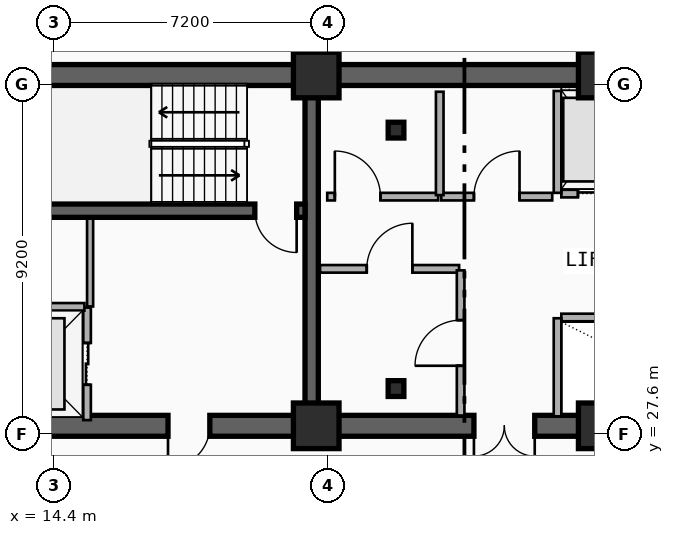
"""IFC4 building model, lengths in metres.
Left out: names, types, materials, properties, quantities, classifications, styles, units other than length and angle.
Written with IfcOpenShell. Run it as: python <this file> out.ifc"""

import sys

from ifc_helpers import new_model, si_unit, direction, frame, frame_2d, origin, origin_2d, place, context, subcontext, project, spatial, rectangle, i_section, extrude, element, fill, save


model = new_model("IFC4")
c1 = context("Model", 3, precision=1e-05, world=origin(), true_north=direction((0.0, 1.0)))
c2 = subcontext(c1, "Body", "Model", "MODEL_VIEW")
j1 = project(units=[si_unit("LENGTHUNIT", "METRE"), si_unit("PLANEANGLEUNIT", "RADIAN")], contexts=[c1])
p1 = place(None, origin())
s1 = spatial("IfcSite", under=j1, at=p1, CompositionType="ELEMENT")
p2 = place(p1, origin())
s2 = spatial("IfcBuilding", under=s1, at=p2, CompositionType="ELEMENT")
p3 = place(p2, frame((0.0, 0.0, 169.65)))
s3 = spatial("IfcBuildingStorey", under=s2, at=p3, CompositionType="ELEMENT", Elevation=169.65)
p4 = place(p3, frame((12.15, 37.05, 0.0), z_axis=(0.0, 0.0, 1.0), x_axis=(1.0, 0.0, 0.0)))
e1 = element("IfcWall", 1, at=p4, inside=s3, PredefinedType="SHEAR", context=c2, shape_type="SweptSolid", body=[
    extrude(rectangle(XDim=33.23, YDim=0.55, at=frame_2d((16.615, 0.0))), origin(), (0.0, 0.0, 1.0), 3.55),
])
p5 = place(p3, frame((21.18, 27.82, 0.0), z_axis=(0.0, 0.0, 1.0), x_axis=(-1.0, 0.0, 0.0)))
e2 = element("IfcWall", 2, at=p5, inside=s3, PredefinedType="SHEAR", context=c2, shape_type="SweptSolid", body=[
    extrude(rectangle(XDim=9.03, YDim=0.55, at=frame_2d((4.515, 0.0))), origin(), (0.0, 0.0, 1.0), 3.55),
])
p6 = place(p5, frame((2.68, 0.0, 0.0)))
e3 = element("IfcOpeningElement", 3, at=p6, cuts=e2, PredefinedType="OPENING", context=c2, shape_type="SweptSolid", body=[
    extrude(rectangle(XDim=1.1, YDim=2.15, at=frame_2d((0.55, 1.075))), frame((0.0, 0.285, 0.0), z_axis=(0.0, -1.0, 0.0), x_axis=(1.0, 0.0, 0.0)), (0.0, 0.0, 1.0), 0.57),
])
p7 = place(p3, frame((33.15, 27.82, 0.0), z_axis=(0.0, 0.0, 1.0), x_axis=(-1.0, 0.0, 0.0)))
e4 = element("IfcWall", 4, at=p7, inside=s3, PredefinedType="SHEAR", context=c2, shape_type="SweptSolid", body=[
    extrude(rectangle(XDim=11.97, YDim=0.55, at=frame_2d((5.985, 0.0))), origin(), (0.0, 0.0, 1.0), 3.55),
])
p8 = place(p7, frame((6.1, 0.0, 0.0)))
e5 = element("IfcOpeningElement", 5, at=p8, cuts=e4, PredefinedType="OPENING", context=c2, shape_type="SweptSolid", body=[
    extrude(rectangle(XDim=1.6, YDim=2.2, at=frame_2d((0.8, 1.1))), frame((0.0, 0.285, 0.0), z_axis=(0.0, -1.0, 0.0), x_axis=(1.0, 0.0, 0.0)), (0.0, 0.0, 1.0), 0.57),
])
p9 = place(p3, frame((21.18, 28.095, 0.0), z_axis=(0.0, 0.0, 1.0), x_axis=(0.0, 1.0, 0.0)))
e6 = element("IfcWall", 6, at=p9, inside=s3, PredefinedType="SHEAR", context=c2, shape_type="SweptSolid", body=[
    extrude(rectangle(XDim=8.68, YDim=0.35, at=frame_2d((4.34, 0.0))), origin(), (0.0, 0.0, 1.0), 3.55),
])
p10 = place(p3, frame((21.005, 33.48, 0.0), z_axis=(0.0, 0.0, 1.0), x_axis=(-1.0, 0.0, 0.0)))
e7 = element("IfcWall", 7, at=p10, inside=s3, PredefinedType="SHEAR", context=c2, shape_type="SweptSolid", body=[
    extrude(rectangle(XDim=8.58, YDim=0.35, at=frame_2d((4.29, 0.0))), origin(), (0.0, 0.0, 1.0), 3.55),
])
p11 = place(p10, frame((0.22, 0.0, 0.0)))
e8 = element("IfcOpeningElement", 8, at=p11, cuts=e7, PredefinedType="OPENING", context=c2, shape_type="SweptSolid", body=[
    extrude(rectangle(XDim=1.1, YDim=2.15, at=frame_2d((0.55, 1.075))), frame((0.0, 0.185, 0.0), z_axis=(0.0, -1.0, 0.0), x_axis=(1.0, 0.0, 0.0)), (0.0, 0.0, 1.0), 0.37),
])
for number, where, z_axis, x_axis in (
    (9, (23.4, 28.8, 0.0), (0.0, 0.0, 1.0), (1.0, 0.0, 0.0)),
    (10, (23.4, 35.6, 0.0), (0.0, 0.0, 1.0), (1.0, 0.0, 0.0)),
):
    element("IfcColumn", number, at=place(p3, frame(where, z_axis=z_axis, x_axis=x_axis)), inside=s3, PredefinedType="COLUMN", context=c2, shape_type="SweptSolid", body=[
        extrude(i_section(OverallWidth=0.413, OverallDepth=0.415, WebThickness=0.03, FlangeThickness=0.047, FilletRadius=0.015, at=origin_2d()), origin(), (0.0, 0.0, 1.0), 3.55),
    ])
for number, where, z_axis, x_axis in (
    (11, (21.3, 27.82, 0.0), (0.0, 0.0, 1.0), (1.0, 0.0, 0.0)),
    (12, (21.3, 37.05, 0.0), (0.0, 0.0, 1.0), (1.0, 0.0, 0.0)),
    (13, (28.8, 27.82, 0.0), (0.0, 0.0, 1.0), (1.0, 0.0, 0.0)),
    (14, (28.8, 37.05, 0.0), (0.0, 0.0, 1.0), (1.0, 0.0, 0.0)),
):
    element("IfcColumn", number, at=place(p3, frame(where, z_axis=z_axis, x_axis=x_axis)), inside=s3, PredefinedType="COLUMN", context=c2, shape_type="SweptSolid", body=[
        extrude(rectangle(XDim=1.2, YDim=1.2, at=origin_2d()), origin(), (0.0, 0.0, 1.0), 3.55),
    ])
p12 = place(p3, frame((15.27, 27.97, 0.0), z_axis=(0.0, 0.0, 1.0), x_axis=(0.0, 1.0, 0.0)))
e15 = element("IfcWall", 15, at=p12, inside=s3, PredefinedType="PARTITIONING", context=c2, shape_type="SweptSolid", body=[
    extrude(rectangle(XDim=2.96, YDim=0.2, at=frame_2d((1.48, 0.0))), origin(), (0.0, 0.0, 1.0), 2.36),
])
p13 = place(p12, frame((0.93, 0.0, 0.0)))
e16 = element("IfcOpeningElement", 16, at=p13, cuts=e15, PredefinedType="OPENING", context=c2, shape_type="SweptSolid", body=[
    extrude(rectangle(XDim=1.1, YDim=2.15, at=frame_2d((0.55, 1.075))), frame((0.0, 0.11, 0.0), z_axis=(0.0, -1.0, 0.0), x_axis=(1.0, 0.0, 0.0)), (0.0, 0.0, 1.0), 0.22),
])
p14 = place(p3, frame((12.45, 30.95, 0.0), z_axis=(0.0, 0.0, 1.0), x_axis=(1.0, 0.0, 0.0)))
e17 = element("IfcWall", 17, at=p14, inside=s3, PredefinedType="PARTITIONING", context=c2, shape_type="SweptSolid", body=[
    extrude(rectangle(XDim=2.75, YDim=0.2, at=frame_2d((1.375, 0.0))), origin(), (0.0, 0.0, 1.0), 2.36),
])
p15 = place(p3, frame((27.75, 30.67, 0.0), z_axis=(0.0, 0.0, 1.0), x_axis=(1.0, 0.0, 0.0)))
e18 = element("IfcWall", 18, at=p15, inside=s3, PredefinedType="PARTITIONING", context=c2, shape_type="SweptSolid", body=[
    extrude(rectangle(XDim=1.975, YDim=0.2, at=frame_2d((0.988, 0.0))), origin(), (0.0, 0.0, 1.0), 2.36),
])
p16 = place(p3, frame((27.65, 28.07, 0.0), z_axis=(0.0, 0.0, 1.0), x_axis=(0.0, 1.0, 0.0)))
e19 = element("IfcWall", 19, at=p16, inside=s3, PredefinedType="PARTITIONING", context=c2, shape_type="SweptSolid", body=[
    extrude(rectangle(XDim=2.58, YDim=0.2, at=frame_2d((1.29, 0.0))), origin(), (0.0, 0.0, 1.0), 2.36),
])
p17 = place(p3, frame((27.75, 33.93, 0.0), z_axis=(0.0, 0.0, 1.0), x_axis=(1.0, 0.0, 0.0)))
e20 = element("IfcWall", 20, at=p17, inside=s3, PredefinedType="PARTITIONING", context=c2, shape_type="SweptSolid", body=[
    extrude(rectangle(XDim=1.975, YDim=0.2, at=frame_2d((0.988, 0.0))), origin(), (0.0, 0.0, 1.0), 2.36),
])
p18 = place(p17, frame((0.438, 0.0, 0.0)))
e21 = element("IfcOpeningElement", 21, at=p18, cuts=e20, PredefinedType="OPENING", context=c2, shape_type="SweptSolid", body=[
    extrude(rectangle(XDim=1.1, YDim=2.15, at=frame_2d((0.55, 1.075))), frame((0.0, 0.11, 0.0), z_axis=(0.0, -1.0, 0.0), x_axis=(1.0, 0.0, 0.0)), (0.0, 0.0, 1.0), 0.22),
])
p19 = place(p3, frame((27.65, 33.95, 0.0), z_axis=(0.0, 0.0, 1.0), x_axis=(0.0, 1.0, 0.0)))
e22 = element("IfcWall", 22, at=p19, inside=s3, PredefinedType="PARTITIONING", context=c2, shape_type="SweptSolid", body=[
    extrude(rectangle(XDim=2.68, YDim=0.2, at=frame_2d((1.34, 0.0))), origin(), (0.0, 0.0, 1.0), 2.36),
])
p20 = place(p3, frame((21.4, 31.95, 0.0), z_axis=(0.0, 0.0, 1.0), x_axis=(1.0, 0.0, 0.0)))
e23 = element("IfcWall", 23, at=p20, inside=s3, PredefinedType="PARTITIONING", context=c2, shape_type="SweptSolid", body=[
    extrude(rectangle(XDim=3.66, YDim=0.2, at=frame_2d((1.83, 0.0))), origin(), (0.0, 0.0, 1.0), 2.36),
])
p21 = place(p20, frame((1.23, 0.0, 0.0)))
e24 = element("IfcOpeningElement", 24, at=p21, cuts=e23, PredefinedType="OPENING", context=c2, shape_type="SweptSolid", body=[
    extrude(rectangle(XDim=1.2, YDim=2.15, at=frame_2d((0.6, 1.075))), frame((0.0, 0.11, 0.0), z_axis=(0.0, -1.0, 0.0), x_axis=(1.0, 0.0, 0.0)), (0.0, 0.0, 1.0), 0.22),
])
p22 = place(p3, frame((21.59, 33.85, 0.0), z_axis=(0.0, 0.0, 1.0), x_axis=(1.0, 0.0, 0.0)))
e25 = element("IfcWall", 25, at=p22, inside=s3, PredefinedType="PARTITIONING", context=c2, shape_type="SweptSolid", body=[
    extrude(rectangle(XDim=2.92, YDim=0.2, at=frame_2d((1.46, 0.0))), origin(), (0.0, 0.0, 1.0), 2.36),
])
p23 = place(p22, frame((0.2, 0.0, 0.0)))
e26 = element("IfcOpeningElement", 26, at=p23, cuts=e25, PredefinedType="OPENING", context=c2, shape_type="SweptSolid", body=[
    extrude(rectangle(XDim=1.2, YDim=2.15, at=frame_2d((0.6, 1.075))), frame((0.0, 0.11, 0.0), z_axis=(0.0, -1.0, 0.0), x_axis=(1.0, 0.0, 0.0)), (0.0, 0.0, 1.0), 0.22),
])
p24 = place(p3, frame((24.59, 33.85, 0.0), z_axis=(0.0, 0.0, 1.0), x_axis=(1.0, 0.0, 0.0)))
e27 = element("IfcWall", 27, at=p24, inside=s3, PredefinedType="PARTITIONING", context=c2, shape_type="SweptSolid", body=[
    extrude(rectangle(XDim=2.92, YDim=0.2, at=frame_2d((1.46, 0.0))), origin(), (0.0, 0.0, 1.0), 3.29),
])
p25 = place(p24, frame((0.86, 0.0, 0.0)))
e28 = element("IfcOpeningElement", 28, at=p25, cuts=e27, PredefinedType="OPENING", context=c2, shape_type="SweptSolid", body=[
    extrude(rectangle(XDim=1.2, YDim=2.15, at=frame_2d((0.6, 1.075))), frame((0.0, 0.11, 0.0), z_axis=(0.0, -1.0, 0.0), x_axis=(1.0, 0.0, 0.0)), (0.0, 0.0, 1.0), 0.22),
])
p26 = place(p3, frame((25.1, 28.09, 0.0), z_axis=(0.0, 0.0, 1.0), x_axis=(0.0, 1.0, 0.0)))
e29 = element("IfcWall", 29, at=p26, inside=s3, PredefinedType="PARTITIONING", context=c2, shape_type="SweptSolid", body=[
    extrude(rectangle(XDim=3.82, YDim=0.2, at=frame_2d((1.91, 0.0))), origin(), (0.0, 0.0, 1.0), 2.67),
])
p27 = place(p26, frame((1.31, 0.0, 0.0)))
e30 = element("IfcOpeningElement", 30, at=p27, cuts=e29, PredefinedType="OPENING", context=c2, shape_type="SweptSolid", body=[
    extrude(rectangle(XDim=1.2, YDim=2.15, at=frame_2d((0.6, 1.075))), frame((0.0, 0.11, 0.0), z_axis=(0.0, -1.0, 0.0), x_axis=(1.0, 0.0, 0.0)), (0.0, 0.0, 1.0), 0.22),
])
p28 = place(p3, frame((24.55, 33.89, 0.0), z_axis=(0.0, 0.0, 1.0), x_axis=(0.0, 1.0, 0.0)))
e31 = element("IfcWall", 31, at=p28, inside=s3, PredefinedType="PARTITIONING", context=c2, shape_type="SweptSolid", body=[
    extrude(rectangle(XDim=2.72, YDim=0.2, at=frame_2d((1.36, 0.0))), origin(), (0.0, 0.0, 1.0), 3.29),
])
p29 = place(p3, frame((15.35, 30.96, 0.0), z_axis=(0.0, 0.0, 1.0), x_axis=(0.0, 1.0, 0.0)))
e32 = element("IfcWall", 32, at=p29, inside=s3, PredefinedType="PARTITIONING", context=c2, shape_type="SweptSolid", body=[
    extrude(rectangle(XDim=2.31, YDim=0.16, at=frame_2d((1.155, 0.0))), origin(), (0.0, 0.0, 1.0), 3.29),
])
p30 = place(p13, origin())
e33 = element("IfcDoor", 33, at=p30, inside=s3, OperationType="DOUBLE_DOOR_SLIDING", PredefinedType="DOOR", context=c2, shape_type="SweptSolid", body=[
    extrude(rectangle(XDim=1.1, YDim=2.15, at=frame_2d((0.55, 1.075))), frame((0.0, 0.025, 0.0), z_axis=(0.0, -1.0, 0.0), x_axis=(1.0, 0.0, 0.0)), (0.0, 0.0, 1.0), 0.05),
])
fill(e16, e33)
p31 = place(p18, origin())
e34 = element("IfcDoor", 34, at=p31, inside=s3, OperationType="DOUBLE_DOOR_SLIDING", PredefinedType="DOOR", context=c2, shape_type="SweptSolid", body=[
    extrude(rectangle(XDim=1.1, YDim=2.15, at=frame_2d((0.55, 1.075))), frame((0.0, 0.025, 0.0), z_axis=(0.0, -1.0, 0.0), x_axis=(1.0, 0.0, 0.0)), (0.0, 0.0, 1.0), 0.05),
])
fill(e21, e34)
p32 = place(p11, origin())
e35 = element("IfcDoor", 35, at=p32, inside=s3, OperationType="SINGLE_SWING_LEFT", PredefinedType="DOOR", context=c2, shape_type="SweptSolid", body=[
    extrude(rectangle(XDim=1.1, YDim=2.15, at=frame_2d((0.55, 1.075))), frame((0.0, 0.025, 0.0), z_axis=(0.0, -1.0, 0.0), x_axis=(1.0, 0.0, 0.0)), (0.0, 0.0, 1.0), 0.05),
])
fill(e8, e35)
p33 = place(p6, origin())
e36 = element("IfcDoor", 36, at=p33, inside=s3, OperationType="SINGLE_SWING_RIGHT", PredefinedType="DOOR", context=c2, shape_type="SweptSolid", body=[
    extrude(rectangle(XDim=1.1, YDim=2.15, at=frame_2d((0.55, 1.075))), frame((0.0, 0.025, 0.0), z_axis=(0.0, -1.0, 0.0), x_axis=(1.0, 0.0, 0.0)), (0.0, 0.0, 1.0), 0.05),
])
fill(e3, e36)
p34 = place(p8, origin())
e37 = element("IfcDoor", 37, at=p34, inside=s3, OperationType="SINGLE_SWING_LEFT", PredefinedType="DOOR", context=c2, shape_type="SweptSolid", body=[
    extrude(rectangle(XDim=1.6, YDim=2.2, at=frame_2d((0.8, 1.1))), frame((0.0, 0.025, 0.0), z_axis=(0.0, -1.0, 0.0), x_axis=(1.0, 0.0, 0.0)), (0.0, 0.0, 1.0), 0.05),
])
fill(e5, e37)
p35 = place(p21, origin())
e38 = element("IfcDoor", 38, at=p35, inside=s3, OperationType="SINGLE_SWING_RIGHT", PredefinedType="DOOR", context=c2, shape_type="SweptSolid", body=[
    extrude(rectangle(XDim=1.2, YDim=2.15, at=frame_2d((0.6, 1.075))), frame((0.0, 0.025, 0.0), z_axis=(0.0, -1.0, 0.0), x_axis=(1.0, 0.0, 0.0)), (0.0, 0.0, 1.0), 0.05),
])
fill(e24, e38)
p36 = place(p23, origin())
e39 = element("IfcDoor", 39, at=p36, inside=s3, OperationType="SINGLE_SWING_LEFT", PredefinedType="DOOR", context=c2, shape_type="SweptSolid", body=[
    extrude(rectangle(XDim=1.2, YDim=2.15, at=frame_2d((0.6, 1.075))), frame((0.0, 0.025, 0.0), z_axis=(0.0, -1.0, 0.0), x_axis=(1.0, 0.0, 0.0)), (0.0, 0.0, 1.0), 0.05),
])
fill(e26, e39)
p37 = place(p25, origin())
e40 = element("IfcDoor", 40, at=p37, inside=s3, OperationType="SINGLE_SWING_RIGHT", PredefinedType="DOOR", context=c2, shape_type="SweptSolid", body=[
    extrude(rectangle(XDim=1.2, YDim=2.15, at=frame_2d((0.6, 1.075))), frame((0.0, 0.025, 0.0), z_axis=(0.0, -1.0, 0.0), x_axis=(1.0, 0.0, 0.0)), (0.0, 0.0, 1.0), 0.05),
])
fill(e28, e40)
p38 = place(p27, origin())
e41 = element("IfcDoor", 41, at=p38, inside=s3, OperationType="SINGLE_SWING_LEFT", PredefinedType="DOOR", context=c2, shape_type="SweptSolid", body=[
    extrude(rectangle(XDim=1.2, YDim=2.15, at=frame_2d((0.6, 1.075))), frame((0.0, 0.025, 0.0), z_axis=(0.0, -1.0, 0.0), x_axis=(1.0, 0.0, 0.0)), (0.0, 0.0, 1.0), 0.05),
])
fill(e30, e41)
save(model, sys.argv[1])
